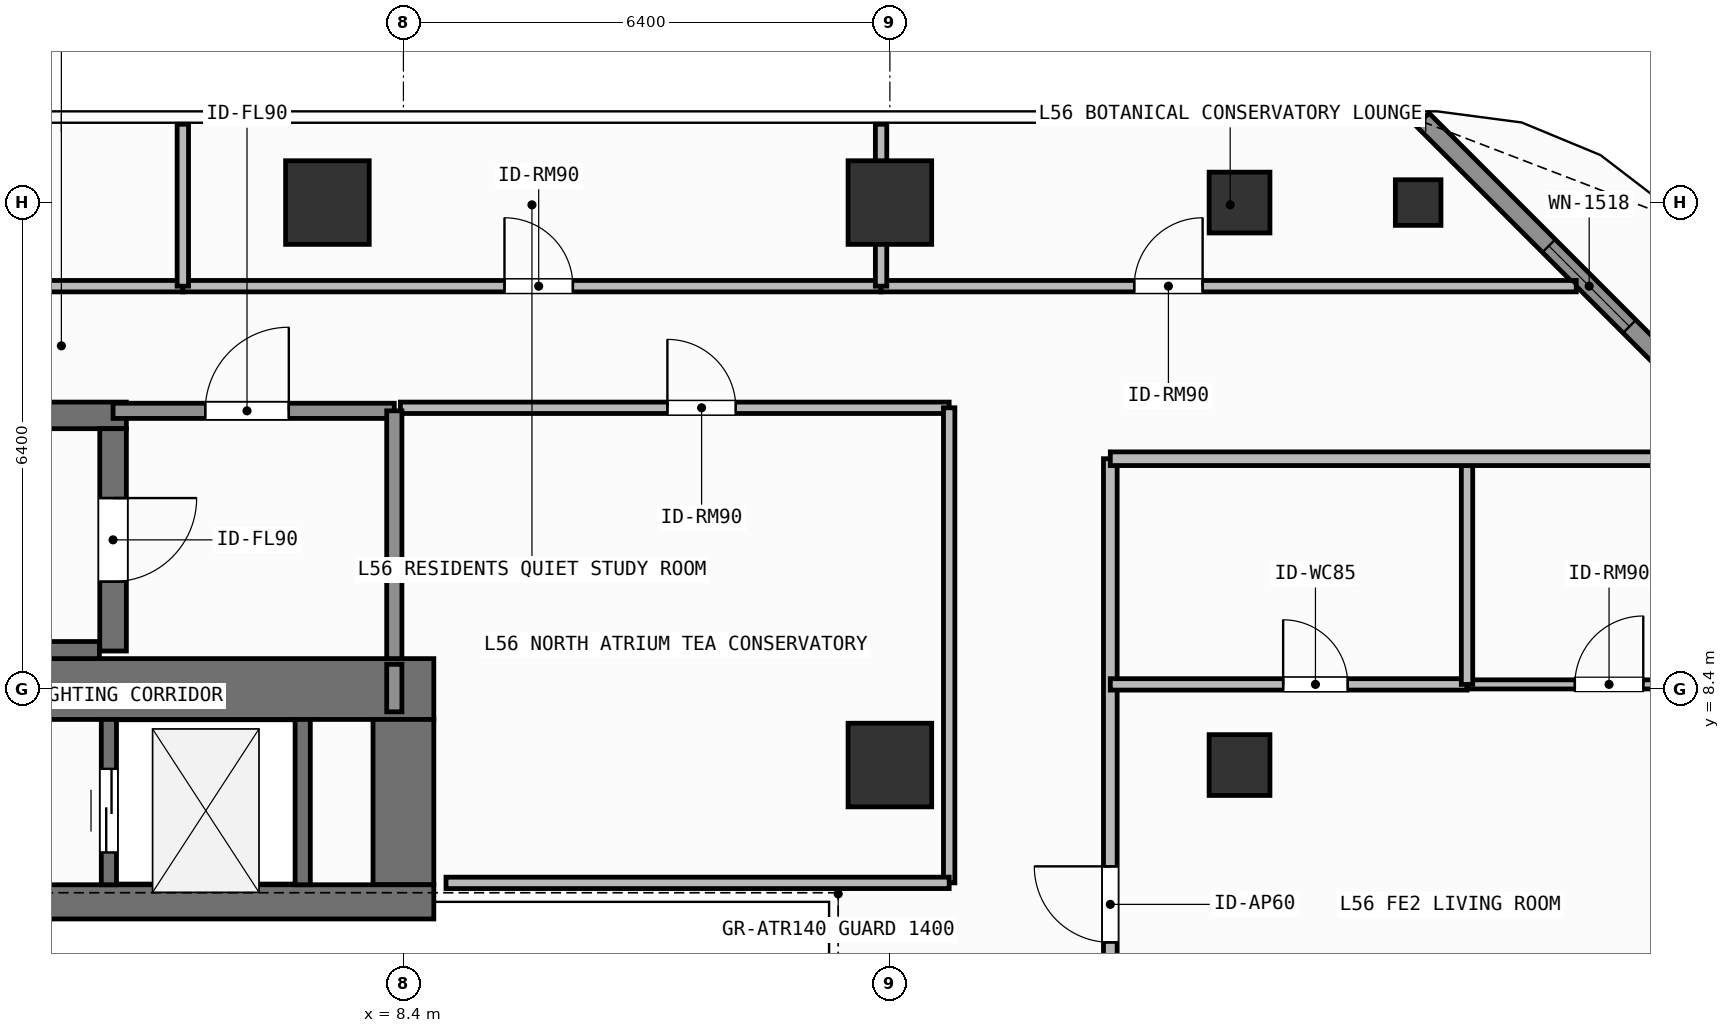
"""IFC4 building model, lengths in metres.
Left out: names, types, materials, properties, quantities, classifications, styles, units other than length and angle.
Written with IfcOpenShell. Run it as: python <this file> out.ifc"""

import sys

from ifc_helpers import new_model, si_unit, direction, frame, frame_2d, origin, origin_2d, place, context, subcontext, project, spatial, rectangle, hollow_rectangle, extrude, element, fill, save


model = new_model("IFC4")
c1 = context("Model", 3, precision=1e-05, world=origin(), true_north=direction((0.0, 1.0)))
c2 = subcontext(c1, "Body", "Model", "MODEL_VIEW")
j1 = project(units=[si_unit("LENGTHUNIT", "METRE"), si_unit("PLANEANGLEUNIT", "RADIAN")], contexts=[c1])
p1 = place(None, origin())
s1 = spatial("IfcSite", under=j1, at=p1, CompositionType="ELEMENT")
p2 = place(p1, origin())
s2 = spatial("IfcBuilding", under=s1, at=p2, CompositionType="ELEMENT")
p3 = place(p2, frame((0.0, 0.0, 227.4)))
s3 = spatial("IfcBuildingStorey", under=s2, at=p3, CompositionType="ELEMENT", Elevation=227.4)
p4 = place(p3, frame((-7.55, 8.4, 0.0), z_axis=(0.0, 0.0, 1.0), x_axis=(1.0, 0.0, 0.0)))
e1 = element("IfcWall", 1, at=p4, inside=s3, PredefinedType="SHEAR", context=c2, shape_type="SweptSolid", body=[
    extrude(rectangle(XDim=16.35, YDim=0.8, at=frame_2d((8.175, 0.0))), origin(), (0.0, 0.0, 1.0), 3.9),
])
p5 = place(p3, frame((8.4, 5.825, 0.0), z_axis=(0.0, 0.0, 1.0), x_axis=(0.0, 1.0, 0.0)))
e2 = element("IfcWall", 2, at=p5, inside=s3, PredefinedType="SHEAR", context=c2, shape_type="SweptSolid", body=[
    extrude(rectangle(XDim=2.175, YDim=0.8, at=frame_2d((1.087, 0.0))), origin(), (0.0, 0.0, 1.0), 3.9),
])
p6 = place(p3, frame((3.045, 5.6, 0.0), z_axis=(0.0, 0.0, 1.0), x_axis=(1.0, 0.0, 0.0)))
e3 = element("IfcWall", 3, at=p6, inside=s3, PredefinedType="SHEAR", context=c2, shape_type="SweptSolid", body=[
    extrude(rectangle(XDim=5.755, YDim=0.45, at=frame_2d((2.877, 0.0))), origin(), (0.0, 0.0, 1.0), 3.9),
])
p7 = place(p3, frame((-2.555, 12.0, 0.0), z_axis=(0.0, 0.0, 1.0), x_axis=(1.0, 0.0, 0.0)))
e4 = element("IfcWall", 4, at=p7, inside=s3, PredefinedType="SHEAR", context=c2, shape_type="SweptSolid", body=[
    extrude(rectangle(XDim=7.31, YDim=0.35, at=frame_2d((3.655, 0.0))), origin(), (0.0, 0.0, 1.0), 3.9),
])
p8 = place(p3, frame((-2.2, 8.913, 0.0), z_axis=(0.0, 0.0, 1.0), x_axis=(1.0, 0.0, 0.0)))
e5 = element("IfcWall", 5, at=p8, inside=s3, PredefinedType="SHEAR", context=c2, shape_type="SweptSolid", body=[
    extrude(rectangle(XDim=6.6, YDim=0.225, at=frame_2d((3.3, 0.0))), origin(), (0.0, 0.0, 1.0), 3.9),
])
p9 = place(p3, frame((4.58, 11.825, 0.0), z_axis=(0.0, 0.0, 1.0), x_axis=(0.0, -1.0, 0.0)))
e6 = element("IfcWall", 6, at=p9, inside=s3, PredefinedType="SHEAR", context=c2, shape_type="SweptSolid", body=[
    extrude(rectangle(XDim=2.925, YDim=0.35, at=frame_2d((1.462, 0.0))), origin(), (0.0, 0.0, 1.0), 3.9),
])
p10 = place(p9, frame((0.913, 0.0, 0.0)))
e7 = element("IfcOpeningElement", 7, at=p10, cuts=e6, PredefinedType="OPENING", context=c2, shape_type="SweptSolid", body=[
    extrude(rectangle(XDim=1.1, YDim=2.15, at=frame_2d((0.55, 1.075))), frame((0.0, 0.185, 0.0), z_axis=(0.0, -1.0, 0.0), x_axis=(1.0, 0.0, 0.0)), (0.0, 0.0, 1.0), 0.37),
])
for number, where, z_axis, x_axis in (
    (8, (7.4, 14.8, 0.0), (0.0, 0.0, 1.0), (1.0, 0.0, 0.0)),
    (9, (14.8, 14.8, 0.0), (0.0, 0.0, 1.0), (1.0, 0.0, 0.0)),
    (10, (14.8, 7.4, 0.0), (0.0, 0.0, 1.0), (1.0, 0.0, 0.0)),
):
    element("IfcColumn", number, at=place(p3, frame(where, z_axis=z_axis, x_axis=x_axis)), inside=s3, PredefinedType="COLUMN", context=c2, shape_type="SweptSolid", body=[
        extrude(rectangle(XDim=1.1, YDim=1.1, at=origin_2d()), origin(), (0.0, 0.0, 1.0), 3.9),
    ])
for number, where, z_axis, x_axis in (
    (11, (19.4, 7.4, 0.0), (0.0, 0.0, 1.0), (1.0, 0.0, 0.0)),
    (12, (19.4, 14.8, 0.0), (0.0, 0.0, 1.0), (1.0, 0.0, 0.0)),
):
    element("IfcColumn", number, at=place(p3, frame(where, z_axis=z_axis, x_axis=x_axis)), inside=s3, PredefinedType="COLUMN", context=c2, shape_type="SweptSolid", body=[
        extrude(hollow_rectangle(XDim=0.8, YDim=0.8, WallThickness=0.036, at=origin_2d()), origin(), (0.0, 0.0, 1.0), 3.9),
    ])
p11 = place(p3, frame((21.75, 14.8, 0.0), z_axis=(0.0, 0.0, 1.0), x_axis=(1.0, 0.0, 0.0)))
e13 = element("IfcColumn", 13, at=p11, inside=s3, PredefinedType="COLUMN", context=c2, shape_type="SweptSolid", body=[
    extrude(hollow_rectangle(XDim=0.6, YDim=0.6, WallThickness=0.028, at=origin_2d()), origin(), (0.0, 0.0, 1.0), 3.9),
])
p12 = place(p3, frame((21.808, 15.892, 0.0), z_axis=(0.0, 0.0, 1.0), x_axis=(0.707106781187, -0.707106781187, 0.0)))
e14 = element("IfcWall", 14, at=p12, inside=s3, PredefinedType="SOLIDWALL", context=c2, shape_type="SweptSolid", body=[
    extrude(rectangle(XDim=6.201, YDim=0.24, at=frame_2d((3.101, 0.0))), origin(), (0.0, 0.0, 1.0), 3.68),
])
p13 = place(p12, frame((2.351, 0.0, 0.8)))
e15 = element("IfcOpeningElement", 15, at=p13, cuts=e14, PredefinedType="OPENING", context=c2, shape_type="SweptSolid", body=[
    extrude(rectangle(XDim=1.5, YDim=1.85, at=frame_2d((0.75, 0.925))), frame((0.0, 0.13, 0.0), z_axis=(0.0, -1.0, 0.0), x_axis=(1.0, 0.0, 0.0)), (0.0, 0.0, 1.0), 0.26),
])
p14 = place(p3, frame((4.525, 5.825, 0.0), z_axis=(0.0, 0.0, 1.0), x_axis=(0.0, 1.0, 0.0)))
e16 = element("IfcWall", 16, at=p14, inside=s3, PredefinedType="SHEAR", context=c2, shape_type="SweptSolid", body=[
    extrude(rectangle(XDim=2.175, YDim=0.2, at=frame_2d((1.087, 0.0))), origin(), (0.0, 0.0, 1.0), 3.68),
])
p15 = place(p14, frame((0.425, 0.0, 0.0)))
e17 = element("IfcOpeningElement", 17, at=p15, cuts=e16, PredefinedType="OPENING", context=c2, shape_type="SweptSolid", body=[
    extrude(rectangle(XDim=1.1, YDim=2.2, at=frame_2d((0.55, 1.1))), frame((0.0, 0.11, 0.0), z_axis=(0.0, -1.0, 0.0), x_axis=(1.0, 0.0, 0.0)), (0.0, 0.0, 1.0), 0.22),
])
p16 = place(p3, frame((7.075, 5.825, 0.0), z_axis=(0.0, 0.0, 1.0), x_axis=(0.0, 1.0, 0.0)))
e18 = element("IfcWall", 18, at=p16, inside=s3, PredefinedType="SHEAR", context=c2, shape_type="SweptSolid", body=[
    extrude(rectangle(XDim=2.175, YDim=0.2, at=frame_2d((1.087, 0.0))), origin(), (0.0, 0.0, 1.0), 3.68),
])
p17 = place(p3, frame((4.58, 12.06, 0.0), z_axis=(0.0, 0.0, 1.0), x_axis=(1.0, 0.0, 0.0)))
e19 = element("IfcWall", 19, at=p17, inside=s3, PredefinedType="SOLIDWALL", context=c2, shape_type="SweptSolid", body=[
    extrude(rectangle(XDim=3.7, YDim=0.2, at=frame_2d((1.85, 0.0))), origin(), (0.0, 0.0, 1.0), 3.68),
])
p18 = place(p17, frame((1.212, 0.0, 0.0)))
e20 = element("IfcOpeningElement", 20, at=p18, cuts=e19, PredefinedType="OPENING", context=c2, shape_type="SweptSolid", body=[
    extrude(rectangle(XDim=1.1, YDim=2.15, at=frame_2d((0.55, 1.075))), frame((0.0, 0.11, 0.0), z_axis=(0.0, -1.0, 0.0), x_axis=(1.0, 0.0, 0.0)), (0.0, 0.0, 1.0), 0.22),
])
p19 = place(p3, frame((8.36, 12.1, 0.0), z_axis=(0.0, 0.0, 1.0), x_axis=(1.0, 0.0, 0.0)))
e21 = element("IfcWall", 21, at=p19, inside=s3, PredefinedType="PARTITIONING", context=c2, shape_type="SweptSolid", body=[
    extrude(rectangle(XDim=7.22, YDim=0.15, at=frame_2d((3.61, 0.0))), origin(), (0.0, 0.0, 1.0), 3.68),
])
p20 = place(p19, frame((3.513, 0.0, 0.0)))
e22 = element("IfcOpeningElement", 22, at=p20, cuts=e21, PredefinedType="OPENING", context=c2, shape_type="SweptSolid", body=[
    extrude(rectangle(XDim=0.9, YDim=2.1, at=frame_2d((0.45, 1.05))), frame((0.0, 0.085, 0.0), z_axis=(0.0, -1.0, 0.0), x_axis=(1.0, 0.0, 0.0)), (0.0, 0.0, 1.0), 0.17),
])
p21 = place(p3, frame((-2.889, 13.7, 0.0), z_axis=(0.0, 0.0, 1.0), x_axis=(1.0, 0.0, 0.0)))
e23 = element("IfcWall", 23, at=p21, inside=s3, PredefinedType="PARTITIONING", context=c2, shape_type="SweptSolid", body=[
    extrude(rectangle(XDim=8.387, YDim=0.15, at=frame_2d((4.193, 0.0))), origin(), (0.0, 0.0, 1.0), 3.68),
])
p22 = place(p21, frame((3.743, 0.0, 0.0)))
e24 = element("IfcOpeningElement", 24, at=p22, cuts=e23, PredefinedType="OPENING", context=c2, shape_type="SweptSolid", body=[
    extrude(rectangle(XDim=0.9, YDim=2.1, at=frame_2d((0.45, 1.05))), frame((0.0, 0.085, 0.0), z_axis=(0.0, -1.0, 0.0), x_axis=(1.0, 0.0, 0.0)), (0.0, 0.0, 1.0), 0.17),
])
p23 = place(p3, frame((5.498, 13.7, 0.0), z_axis=(0.0, 0.0, 1.0), x_axis=(1.0, 0.0, 0.0)))
e25 = element("IfcWall", 25, at=p23, inside=s3, PredefinedType="PARTITIONING", context=c2, shape_type="SweptSolid", body=[
    extrude(rectangle(XDim=9.186, YDim=0.15, at=frame_2d((4.593, 0.0))), origin(), (0.0, 0.0, 1.0), 3.68),
])
p24 = place(p23, frame((4.231, 0.0, 0.0)))
e26 = element("IfcOpeningElement", 26, at=p24, cuts=e25, PredefinedType="OPENING", context=c2, shape_type="SweptSolid", body=[
    extrude(rectangle(XDim=0.9, YDim=2.1, at=frame_2d((0.45, 1.05))), frame((0.0, 0.085, 0.0), z_axis=(0.0, -1.0, 0.0), x_axis=(1.0, 0.0, 0.0)), (0.0, 0.0, 1.0), 0.17),
])
p25 = place(p3, frame((14.684, 13.7, 0.0), z_axis=(0.0, 0.0, 1.0), x_axis=(1.0, 0.0, 0.0)))
e27 = element("IfcWall", 27, at=p25, inside=s3, PredefinedType="PARTITIONING", context=c2, shape_type="SweptSolid", body=[
    extrude(rectangle(XDim=9.146, YDim=0.15, at=frame_2d((4.573, 0.0))), origin(), (0.0, 0.0, 1.0), 3.68),
])
p26 = place(p25, frame((3.33, 0.0, 0.0)))
e28 = element("IfcOpeningElement", 28, at=p26, cuts=e27, PredefinedType="OPENING", context=c2, shape_type="SweptSolid", body=[
    extrude(rectangle(XDim=0.9, YDim=2.1, at=frame_2d((0.45, 1.05))), frame((0.0, 0.085, 0.0), z_axis=(0.0, -1.0, 0.0), x_axis=(1.0, 0.0, 0.0)), (0.0, 0.0, 1.0), 0.17),
])
p27 = place(p3, frame((17.7, -1.193, 0.0), z_axis=(0.0, 0.0, 1.0), x_axis=(0.0, 1.0, 0.0)))
e29 = element("IfcWall", 29, at=p27, inside=s3, PredefinedType="PARTITIONING", context=c2, shape_type="SweptSolid", body=[
    extrude(rectangle(XDim=12.623, YDim=0.18, at=frame_2d((6.312, 0.0))), origin(), (0.0, 0.0, 1.0), 3.68),
])
p28 = place(p27, frame((6.26, 0.0, 0.0)))
e30 = element("IfcOpeningElement", 30, at=p28, cuts=e29, PredefinedType="OPENING", context=c2, shape_type="SweptSolid", body=[
    extrude(rectangle(XDim=1.0, YDim=2.2, at=frame_2d((0.5, 1.1))), frame((0.0, 0.1, 0.0), z_axis=(0.0, -1.0, 0.0), x_axis=(1.0, 0.0, 0.0)), (0.0, 0.0, 1.0), 0.2),
])
p29 = place(p3, frame((17.7, 8.461, 0.0), z_axis=(0.0, 0.0, 1.0), x_axis=(1.0, 0.0, 0.0)))
e31 = element("IfcWall", 31, at=p29, inside=s3, PredefinedType="PARTITIONING", context=c2, shape_type="SweptSolid", body=[
    extrude(rectangle(XDim=4.693, YDim=0.15, at=frame_2d((2.347, 0.0))), origin(), (0.0, 0.0, 1.0), 3.68),
])
p30 = place(p29, frame((2.274, 0.0, 0.0)))
e32 = element("IfcOpeningElement", 32, at=p30, cuts=e31, PredefinedType="OPENING", context=c2, shape_type="SweptSolid", body=[
    extrude(rectangle(XDim=0.85, YDim=2.1, at=frame_2d((0.425, 1.05))), frame((0.0, 0.085, 0.0), z_axis=(0.0, -1.0, 0.0), x_axis=(1.0, 0.0, 0.0)), (0.0, 0.0, 1.0), 0.17),
])
p31 = place(p3, frame((22.393, 8.461, 0.0), z_axis=(0.0, 0.0, 1.0), x_axis=(1.0, 0.0, 0.0)))
e33 = element("IfcWall", 33, at=p31, inside=s3, PredefinedType="PARTITIONING", context=c2, shape_type="SweptSolid", body=[
    extrude(rectangle(XDim=3.737, YDim=0.12, at=frame_2d((1.868, 0.0))), origin(), (0.0, 0.0, 1.0), 3.68),
])
p32 = place(p31, frame((1.418, 0.0, 0.0)))
e34 = element("IfcOpeningElement", 34, at=p32, cuts=e33, PredefinedType="OPENING", context=c2, shape_type="SweptSolid", body=[
    extrude(rectangle(XDim=0.9, YDim=2.1, at=frame_2d((0.45, 1.05))), frame((0.0, 0.07, 0.0), z_axis=(0.0, -1.0, 0.0), x_axis=(1.0, 0.0, 0.0)), (0.0, 0.0, 1.0), 0.14),
])
p33 = place(p3, frame((8.28, 8.8, 0.0), z_axis=(0.0, 0.0, 1.0), x_axis=(0.0, 1.0, 0.0)))
e35 = element("IfcWall", 35, at=p33, inside=s3, PredefinedType="SOLIDWALL", context=c2, shape_type="SweptSolid", body=[
    extrude(rectangle(XDim=3.26, YDim=0.2, at=frame_2d((1.63, 0.0))), origin(), (0.0, 0.0, 1.0), 3.68),
])
p34 = place(p3, frame((8.28, 8.1, 0.0), z_axis=(0.0, 0.0, 1.0), x_axis=(0.0, 1.0, 0.0)))
e36 = element("IfcWall", 36, at=p34, inside=s3, PredefinedType="SOLIDWALL", context=c2, shape_type="SweptSolid", body=[
    extrude(rectangle(XDim=0.625, YDim=0.2, at=frame_2d((0.312, 0.0))), origin(), (0.0, 0.0, 1.0), 3.68),
])
p35 = place(p3, frame((15.58, 5.85, 0.0), z_axis=(0.0, 0.0, 1.0), x_axis=(0.0, 1.0, 0.0)))
e37 = element("IfcWall", 37, at=p35, inside=s3, PredefinedType="PARTITIONING", context=c2, shape_type="SweptSolid", body=[
    extrude(rectangle(XDim=6.25, YDim=0.15, at=frame_2d((3.125, 0.0))), origin(), (0.0, 0.0, 1.0), 3.68),
])
p36 = place(p3, frame((8.96, 5.85, 0.0), z_axis=(0.0, 0.0, 1.0), x_axis=(1.0, 0.0, 0.0)))
e38 = element("IfcWall", 38, at=p36, inside=s3, PredefinedType="PARTITIONING", context=c2, shape_type="SweptSolid", body=[
    extrude(rectangle(XDim=6.62, YDim=0.15, at=frame_2d((3.31, 0.0))), origin(), (0.0, 0.0, 1.0), 3.68),
])
p37 = place(p3, frame((5.498, 13.7, 0.0), z_axis=(0.0, 0.0, 1.0), x_axis=(0.0, 1.0, 0.0)))
e39 = element("IfcWall", 39, at=p37, inside=s3, PredefinedType="PARTITIONING", context=c2, shape_type="SweptSolid", body=[
    extrude(rectangle(XDim=2.13, YDim=0.15, at=frame_2d((1.065, 0.0))), origin(), (0.0, 0.0, 1.0), 3.68),
])
p38 = place(p3, frame((14.684, 13.7, 0.0), z_axis=(0.0, 0.0, 1.0), x_axis=(0.0, 1.0, 0.0)))
e40 = element("IfcWall", 40, at=p38, inside=s3, PredefinedType="PARTITIONING", context=c2, shape_type="SweptSolid", body=[
    extrude(rectangle(XDim=2.13, YDim=0.15, at=frame_2d((1.065, 0.0))), origin(), (0.0, 0.0, 1.0), 3.182),
])
p39 = place(p3, frame((22.393, 8.461, 0.0), z_axis=(0.0, 0.0, 1.0), x_axis=(0.0, 1.0, 0.0)))
e41 = element("IfcWall", 41, at=p39, inside=s3, PredefinedType="PARTITIONING", context=c2, shape_type="SweptSolid", body=[
    extrude(rectangle(XDim=2.969, YDim=0.15, at=frame_2d((1.484, 0.0))), origin(), (0.0, 0.0, 1.0), 3.68),
])
p40 = place(p3, frame((17.7, 11.43, 0.0), z_axis=(0.0, 0.0, 1.0), x_axis=(1.0, 0.0, 0.0)))
e42 = element("IfcWall", 42, at=p40, inside=s3, PredefinedType="PARTITIONING", context=c2, shape_type="SweptSolid", body=[
    extrude(rectangle(XDim=8.43, YDim=0.18, at=frame_2d((4.215, 0.0))), origin(), (0.0, 0.0, 1.0), 3.42),
])
p41 = place(p13, origin())
e43 = element("IfcWindow", 43, at=p41, inside=s3, PartitioningType="SINGLE_PANEL", PredefinedType="WINDOW", context=c2, shape_type="SweptSolid", body=[
    extrude(rectangle(XDim=1.5, YDim=1.85, at=frame_2d((0.75, 0.925))), frame((0.0, 0.03, 0.0), z_axis=(0.0, -1.0, 0.0), x_axis=(1.0, 0.0, 0.0)), (0.0, 0.0, 1.0), 0.06),
])
fill(e15, e43)
p42 = place(p15, origin())
e44 = element("IfcDoor", 44, at=p42, inside=s3, OperationType="SLIDING_TO_LEFT", PredefinedType="DOOR", context=c2, shape_type="SweptSolid", body=[
    extrude(rectangle(XDim=1.1, YDim=2.2, at=frame_2d((0.55, 1.1))), frame((0.0, 0.025, 0.0), z_axis=(0.0, -1.0, 0.0), x_axis=(1.0, 0.0, 0.0)), (0.0, 0.0, 1.0), 0.05),
])
fill(e17, e44)
p43 = place(p10, origin())
e45 = element("IfcDoor", 45, at=p43, inside=s3, OperationType="SINGLE_SWING_LEFT", PredefinedType="DOOR", context=c2, shape_type="SweptSolid", body=[
    extrude(rectangle(XDim=1.1, YDim=2.15, at=frame_2d((0.55, 1.075))), frame((0.0, 0.025, 0.0), z_axis=(0.0, -1.0, 0.0), x_axis=(1.0, 0.0, 0.0)), (0.0, 0.0, 1.0), 0.05),
])
fill(e7, e45)
p44 = place(p18, origin())
e46 = element("IfcDoor", 46, at=p44, inside=s3, OperationType="SINGLE_SWING_RIGHT", PredefinedType="DOOR", context=c2, shape_type="SweptSolid", body=[
    extrude(rectangle(XDim=1.1, YDim=2.15, at=frame_2d((0.55, 1.075))), frame((0.0, 0.025, 0.0), z_axis=(0.0, -1.0, 0.0), x_axis=(1.0, 0.0, 0.0)), (0.0, 0.0, 1.0), 0.05),
])
fill(e20, e46)
p45 = place(p20, origin())
e47 = element("IfcDoor", 47, at=p45, inside=s3, OperationType="SINGLE_SWING_LEFT", PredefinedType="DOOR", context=c2, shape_type="SweptSolid", body=[
    extrude(rectangle(XDim=0.9, YDim=2.1, at=frame_2d((0.45, 1.05))), frame((0.0, 0.025, 0.0), z_axis=(0.0, -1.0, 0.0), x_axis=(1.0, 0.0, 0.0)), (0.0, 0.0, 1.0), 0.05),
])
fill(e22, e47)
p46 = place(p24, origin())
e48 = element("IfcDoor", 48, at=p46, inside=s3, OperationType="SINGLE_SWING_LEFT", PredefinedType="DOOR", context=c2, shape_type="SweptSolid", body=[
    extrude(rectangle(XDim=0.9, YDim=2.1, at=frame_2d((0.45, 1.05))), frame((0.0, 0.025, 0.0), z_axis=(0.0, -1.0, 0.0), x_axis=(1.0, 0.0, 0.0)), (0.0, 0.0, 1.0), 0.05),
])
fill(e26, e48)
p47 = place(p26, origin())
e49 = element("IfcDoor", 49, at=p47, inside=s3, OperationType="SINGLE_SWING_RIGHT", PredefinedType="DOOR", context=c2, shape_type="SweptSolid", body=[
    extrude(rectangle(XDim=0.9, YDim=2.1, at=frame_2d((0.45, 1.05))), frame((0.0, 0.025, 0.0), z_axis=(0.0, -1.0, 0.0), x_axis=(1.0, 0.0, 0.0)), (0.0, 0.0, 1.0), 0.05),
])
fill(e28, e49)
p48 = place(p28, origin())
e50 = element("IfcDoor", 50, at=p48, inside=s3, OperationType="SINGLE_SWING_RIGHT", PredefinedType="DOOR", context=c2, shape_type="SweptSolid", body=[
    extrude(rectangle(XDim=1.0, YDim=2.2, at=frame_2d((0.5, 1.1))), frame((0.0, 0.025, 0.0), z_axis=(0.0, -1.0, 0.0), x_axis=(1.0, 0.0, 0.0)), (0.0, 0.0, 1.0), 0.05),
])
fill(e30, e50)
p49 = place(p30, origin())
e51 = element("IfcDoor", 51, at=p49, inside=s3, OperationType="SINGLE_SWING_LEFT", PredefinedType="DOOR", context=c2, shape_type="SweptSolid", body=[
    extrude(rectangle(XDim=0.85, YDim=2.1, at=frame_2d((0.425, 1.05))), frame((0.0, 0.025, 0.0), z_axis=(0.0, -1.0, 0.0), x_axis=(1.0, 0.0, 0.0)), (0.0, 0.0, 1.0), 0.05),
])
fill(e32, e51)
p50 = place(p32, origin())
e52 = element("IfcDoor", 52, at=p50, inside=s3, OperationType="SINGLE_SWING_RIGHT", PredefinedType="DOOR", context=c2, shape_type="SweptSolid", body=[
    extrude(rectangle(XDim=0.9, YDim=2.1, at=frame_2d((0.45, 1.05))), frame((0.0, 0.025, 0.0), z_axis=(0.0, -1.0, 0.0), x_axis=(1.0, 0.0, 0.0)), (0.0, 0.0, 1.0), 0.05),
])
fill(e34, e52)
save(model, sys.argv[1])
